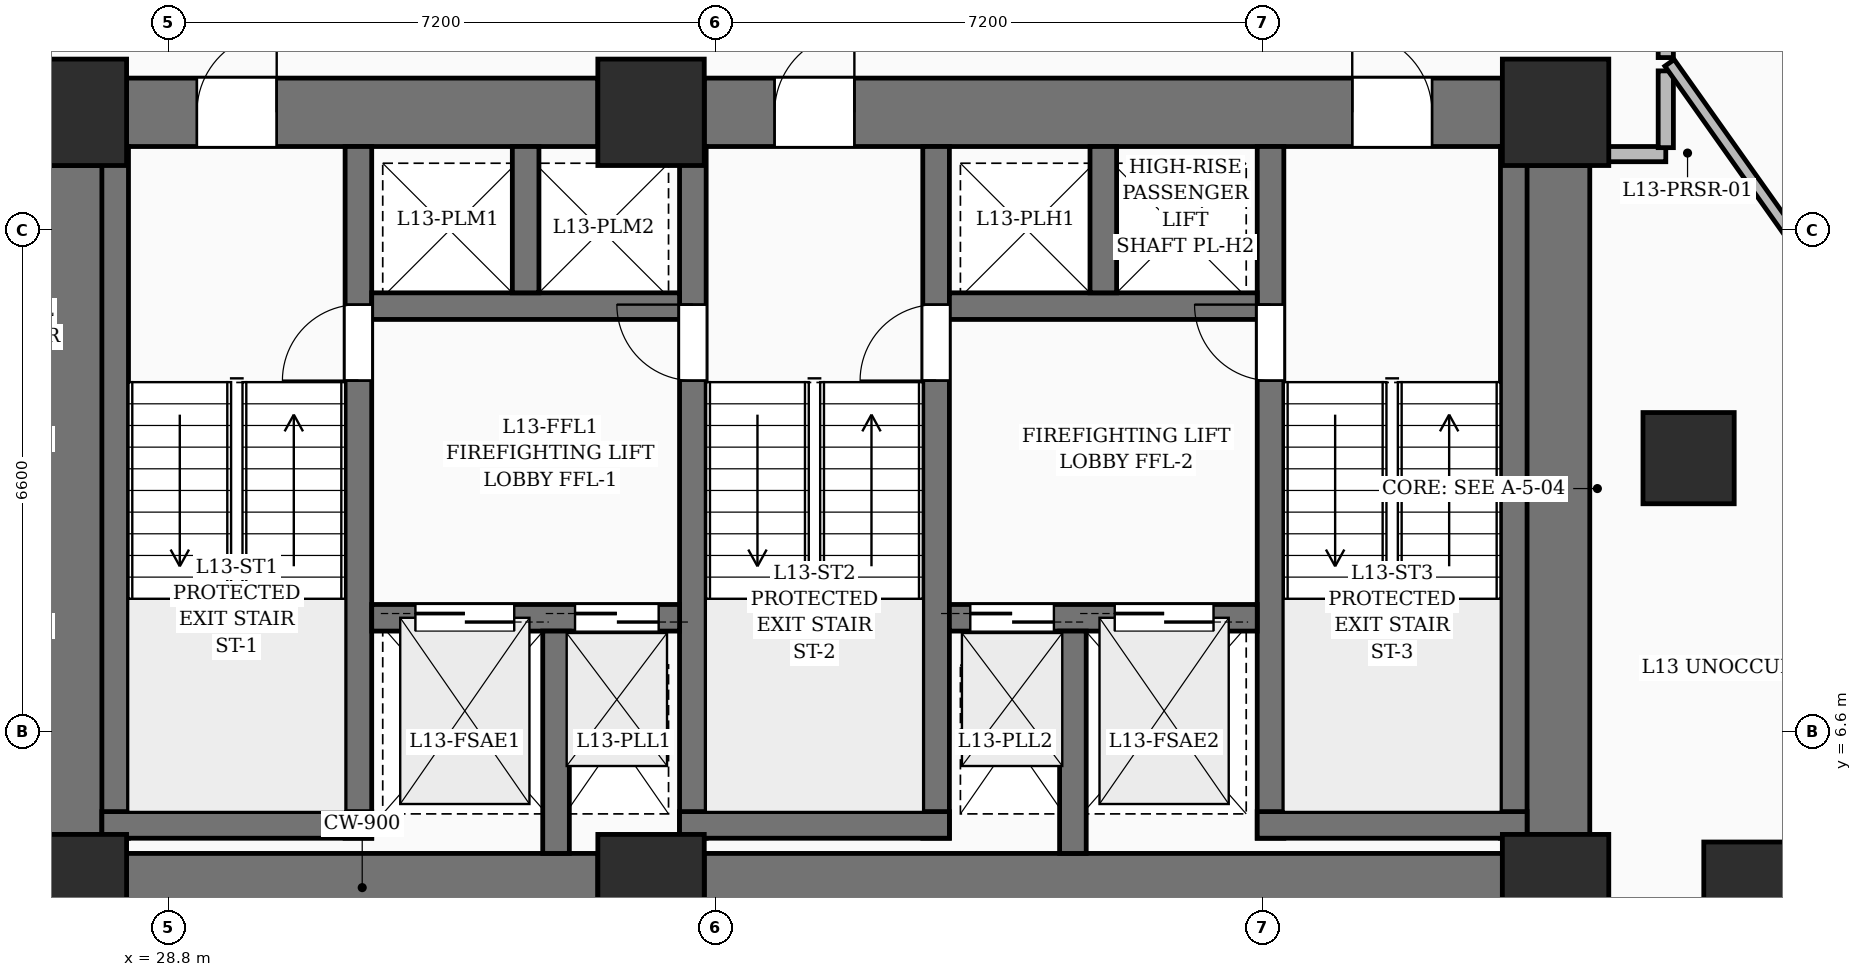
"""IFC4 building model, lengths in metres.
Left out: names, types, materials, properties, quantities, classifications, styles, units other than length and angle.
Written with IfcOpenShell. Run it as: python <this file> out.ifc"""

import sys

from ifc_helpers import new_model, si_unit, direction, frame, frame_2d, origin, origin_2d, place, context, subcontext, project, spatial, rectangle, extrude, element, fill, save


model = new_model("IFC4")
c1 = context("Model", 3, precision=1e-05, world=origin(), true_north=direction((0.0, 1.0)))
c2 = subcontext(c1, "Body", "Model", "MODEL_VIEW")
j1 = project(units=[si_unit("LENGTHUNIT", "METRE"), si_unit("PLANEANGLEUNIT", "RADIAN")], contexts=[c1])
p1 = place(None, origin())
s1 = spatial("IfcSite", under=j1, at=p1, CompositionType="ELEMENT")
p2 = place(p1, origin())
s2 = spatial("IfcBuilding", under=s1, at=p2, CompositionType="ELEMENT")
p3 = place(p2, frame((0.0, 0.0, 57.0)))
s3 = spatial("IfcBuildingStorey", under=s2, at=p3, CompositionType="ELEMENT", Elevation=57.0)
for number, where, z_axis, x_axis in (
    (1, (27.55, 4.55, 0.0), (0.0, 0.0, 1.0), (1.0, 0.0, 0.0)),
    (2, (35.15, 4.55, 0.0), (0.0, 0.0, 1.0), (1.0, 0.0, 0.0)),
    (3, (47.05, 4.55, 0.0), (0.0, 0.0, 1.0), (1.0, 0.0, 0.0)),
    (4, (27.55, 14.75, 0.0), (0.0, 0.0, 1.0), (1.0, 0.0, 0.0)),
    (5, (35.15, 14.75, 0.0), (0.0, 0.0, 1.0), (1.0, 0.0, 0.0)),
    (6, (47.05, 14.75, 0.0), (0.0, 0.0, 1.0), (1.0, 0.0, 0.0)),
):
    element("IfcColumn", number, at=place(p3, frame(where, z_axis=z_axis, x_axis=x_axis)), inside=s3, PredefinedType="COLUMN", context=c2, shape_type="SweptSolid", body=[
        extrude(rectangle(XDim=1.4, YDim=1.4, at=origin_2d()), origin(), (0.0, 0.0, 1.0), 3.6),
    ])
for number, where, z_axis, x_axis in (
    (7, (49.6, 4.55, 0.0), (0.0, 0.0, 1.0), (1.0, 0.0, 0.0)),
    (8, (48.8, 10.2, 0.0), (0.0, 0.0, 1.0), (1.0, 0.0, 0.0)),
):
    element("IfcColumn", number, at=place(p3, frame(where, z_axis=z_axis, x_axis=x_axis)), inside=s3, PredefinedType="COLUMN", context=c2, shape_type="SweptSolid", body=[
        extrude(rectangle(XDim=1.2, YDim=1.2, at=origin_2d()), origin(), (0.0, 0.0, 1.0), 3.6),
    ])
p4 = place(p3, frame((28.25, 4.55, 0.0), z_axis=(0.0, 0.0, 1.0), x_axis=(1.0, 0.0, 0.0)))
e9 = element("IfcWall", 9, at=p4, inside=s3, PredefinedType="SHEAR", context=c2, shape_type="SweptSolid", body=[
    extrude(rectangle(XDim=6.2, YDim=0.9, at=frame_2d((3.1, 0.0))), origin(), (0.0, 0.0, 1.0), 3.6),
])
p5 = place(p3, frame((35.85, 4.55, 0.0), z_axis=(0.0, 0.0, 1.0), x_axis=(1.0, 0.0, 0.0)))
e10 = element("IfcWall", 10, at=p5, inside=s3, PredefinedType="SHEAR", context=c2, shape_type="SweptSolid", body=[
    extrude(rectangle(XDim=10.5, YDim=0.9, at=frame_2d((5.25, 0.0))), origin(), (0.0, 0.0, 1.0), 3.6),
])
p6 = place(p3, frame((28.25, 14.75, 0.0), z_axis=(0.0, 0.0, 1.0), x_axis=(1.0, 0.0, 0.0)))
e11 = element("IfcWall", 11, at=p6, inside=s3, PredefinedType="SHEAR", context=c2, shape_type="SweptSolid", body=[
    extrude(rectangle(XDim=6.2, YDim=0.9, at=frame_2d((3.1, 0.0))), origin(), (0.0, 0.0, 1.0), 3.6),
])
p7 = place(p6, frame((0.925, 0.0, 0.0)))
e12 = element("IfcOpeningElement", 12, at=p7, cuts=e11, PredefinedType="OPENING", context=c2, shape_type="SweptSolid", body=[
    extrude(rectangle(XDim=1.05, YDim=2.15, at=frame_2d((0.525, 1.075))), frame((0.0, 0.46, 0.0), z_axis=(0.0, -1.0, 0.0), x_axis=(1.0, 0.0, 0.0)), (0.0, 0.0, 1.0), 0.92),
])
p8 = place(p3, frame((35.85, 14.75, 0.0), z_axis=(0.0, 0.0, 1.0), x_axis=(1.0, 0.0, 0.0)))
e13 = element("IfcWall", 13, at=p8, inside=s3, PredefinedType="SHEAR", context=c2, shape_type="SweptSolid", body=[
    extrude(rectangle(XDim=10.5, YDim=0.9, at=frame_2d((5.25, 0.0))), origin(), (0.0, 0.0, 1.0), 3.6),
])
p9 = place(p8, frame((0.925, 0.0, 0.0)))
e14 = element("IfcOpeningElement", 14, at=p9, cuts=e13, PredefinedType="OPENING", context=c2, shape_type="SweptSolid", body=[
    extrude(rectangle(XDim=1.05, YDim=2.15, at=frame_2d((0.525, 1.075))), frame((0.0, 0.46, 0.0), z_axis=(0.0, -1.0, 0.0), x_axis=(1.0, 0.0, 0.0)), (0.0, 0.0, 1.0), 0.92),
])
p10 = place(p8, frame((8.525, 0.0, 0.0)))
e15 = element("IfcOpeningElement", 15, at=p10, cuts=e13, PredefinedType="OPENING", context=c2, shape_type="SweptSolid", body=[
    extrude(rectangle(XDim=1.05, YDim=2.15, at=frame_2d((0.525, 1.075))), frame((0.0, 0.46, 0.0), z_axis=(0.0, -1.0, 0.0), x_axis=(1.0, 0.0, 0.0)), (0.0, 0.0, 1.0), 0.92),
])
for number, where, z_axis, x_axis in (
    (16, (27.55, 5.25, 0.0), (0.0, 0.0, 1.0), (0.0, 1.0, 0.0)),
    (17, (47.05, 5.25, 0.0), (0.0, 0.0, 1.0), (0.0, 1.0, 0.0)),
):
    element("IfcWall", number, at=place(p3, frame(where, z_axis=z_axis, x_axis=x_axis)), inside=s3, PredefinedType="SHEAR", context=c2, shape_type="SweptSolid", body=[
        extrude(rectangle(XDim=8.8, YDim=0.9, at=frame_2d((4.4, 0.0))), origin(), (0.0, 0.0, 1.0), 3.6),
    ])
p11 = place(p3, frame((28.1, 5.2, 0.0), z_axis=(0.0, 0.0, 1.0), x_axis=(0.0, 1.0, 0.0)))
e18 = element("IfcWall", 18, at=p11, inside=s3, PredefinedType="SOLIDWALL", context=c2, shape_type="SweptSolid", body=[
    extrude(rectangle(XDim=9.1, YDim=0.35, at=frame_2d((4.55, 0.0))), origin(), (0.0, 0.0, 1.0), 3.6),
])
p12 = place(p3, frame((31.3, 5.2, 0.0), z_axis=(0.0, 0.0, 1.0), x_axis=(0.0, 1.0, 0.0)))
e19 = element("IfcWall", 19, at=p12, inside=s3, PredefinedType="SOLIDWALL", context=c2, shape_type="SweptSolid", body=[
    extrude(rectangle(XDim=9.1, YDim=0.35, at=frame_2d((4.55, 0.0))), origin(), (0.0, 0.0, 1.0), 3.6),
])
p13 = place(p12, frame((6.02, 0.0, 0.0)))
e20 = element("IfcOpeningElement", 20, at=p13, cuts=e19, PredefinedType="OPENING", context=c2, shape_type="SweptSolid", body=[
    extrude(rectangle(XDim=1.0, YDim=2.15, at=frame_2d((0.5, 1.075))), frame((0.0, 0.185, 0.0), z_axis=(0.0, -1.0, 0.0), x_axis=(1.0, 0.0, 0.0)), (0.0, 0.0, 1.0), 0.37),
])
p14 = place(p3, frame((27.925, 5.375, 0.0), z_axis=(0.0, 0.0, 1.0), x_axis=(1.0, 0.0, 0.0)))
e21 = element("IfcWall", 21, at=p14, inside=s3, PredefinedType="SOLIDWALL", context=c2, shape_type="SweptSolid", body=[
    extrude(rectangle(XDim=3.55, YDim=0.35, at=frame_2d((1.775, 0.0))), origin(), (0.0, 0.0, 1.0), 3.6),
])
p15 = place(p3, frame((35.7, 5.2, 0.0), z_axis=(0.0, 0.0, 1.0), x_axis=(0.0, 1.0, 0.0)))
e22 = element("IfcWall", 22, at=p15, inside=s3, PredefinedType="SOLIDWALL", context=c2, shape_type="SweptSolid", body=[
    extrude(rectangle(XDim=9.1, YDim=0.35, at=frame_2d((4.55, 0.0))), origin(), (0.0, 0.0, 1.0), 3.6),
])
p16 = place(p15, frame((6.02, 0.0, 0.0)))
e23 = element("IfcOpeningElement", 23, at=p16, cuts=e22, PredefinedType="OPENING", context=c2, shape_type="SweptSolid", body=[
    extrude(rectangle(XDim=1.0, YDim=2.15, at=frame_2d((0.5, 1.075))), frame((0.0, 0.185, 0.0), z_axis=(0.0, -1.0, 0.0), x_axis=(1.0, 0.0, 0.0)), (0.0, 0.0, 1.0), 0.37),
])
p17 = place(p3, frame((38.9, 5.2, 0.0), z_axis=(0.0, 0.0, 1.0), x_axis=(0.0, 1.0, 0.0)))
e24 = element("IfcWall", 24, at=p17, inside=s3, PredefinedType="SOLIDWALL", context=c2, shape_type="SweptSolid", body=[
    extrude(rectangle(XDim=9.1, YDim=0.35, at=frame_2d((4.55, 0.0))), origin(), (0.0, 0.0, 1.0), 3.6),
])
p18 = place(p17, frame((6.02, 0.0, 0.0)))
e25 = element("IfcOpeningElement", 25, at=p18, cuts=e24, PredefinedType="OPENING", context=c2, shape_type="SweptSolid", body=[
    extrude(rectangle(XDim=1.0, YDim=2.15, at=frame_2d((0.5, 1.075))), frame((0.0, 0.185, 0.0), z_axis=(0.0, -1.0, 0.0), x_axis=(1.0, 0.0, 0.0)), (0.0, 0.0, 1.0), 0.37),
])
p19 = place(p3, frame((35.525, 5.375, 0.0), z_axis=(0.0, 0.0, 1.0), x_axis=(1.0, 0.0, 0.0)))
e26 = element("IfcWall", 26, at=p19, inside=s3, PredefinedType="SOLIDWALL", context=c2, shape_type="SweptSolid", body=[
    extrude(rectangle(XDim=3.55, YDim=0.35, at=frame_2d((1.775, 0.0))), origin(), (0.0, 0.0, 1.0), 3.6),
])
p20 = place(p3, frame((43.3, 5.2, 0.0), z_axis=(0.0, 0.0, 1.0), x_axis=(0.0, 1.0, 0.0)))
e27 = element("IfcWall", 27, at=p20, inside=s3, PredefinedType="SOLIDWALL", context=c2, shape_type="SweptSolid", body=[
    extrude(rectangle(XDim=9.1, YDim=0.35, at=frame_2d((4.55, 0.0))), origin(), (0.0, 0.0, 1.0), 3.6),
])
p21 = place(p20, frame((6.02, 0.0, 0.0)))
e28 = element("IfcOpeningElement", 28, at=p21, cuts=e27, PredefinedType="OPENING", context=c2, shape_type="SweptSolid", body=[
    extrude(rectangle(XDim=1.0, YDim=2.15, at=frame_2d((0.5, 1.075))), frame((0.0, 0.185, 0.0), z_axis=(0.0, -1.0, 0.0), x_axis=(1.0, 0.0, 0.0)), (0.0, 0.0, 1.0), 0.37),
])
p22 = place(p3, frame((46.5, 5.2, 0.0), z_axis=(0.0, 0.0, 1.0), x_axis=(0.0, 1.0, 0.0)))
e29 = element("IfcWall", 29, at=p22, inside=s3, PredefinedType="SOLIDWALL", context=c2, shape_type="SweptSolid", body=[
    extrude(rectangle(XDim=9.1, YDim=0.35, at=frame_2d((4.55, 0.0))), origin(), (0.0, 0.0, 1.0), 3.6),
])
p23 = place(p3, frame((43.125, 5.375, 0.0), z_axis=(0.0, 0.0, 1.0), x_axis=(1.0, 0.0, 0.0)))
e30 = element("IfcWall", 30, at=p23, inside=s3, PredefinedType="SOLIDWALL", context=c2, shape_type="SweptSolid", body=[
    extrude(rectangle(XDim=3.55, YDim=0.35, at=frame_2d((1.775, 0.0))), origin(), (0.0, 0.0, 1.0), 3.6),
])
p24 = place(p3, frame((31.475, 8.1, 0.0), z_axis=(0.0, 0.0, 1.0), x_axis=(1.0, 0.0, 0.0)))
e31 = element("IfcWall", 31, at=p24, inside=s3, PredefinedType="SOLIDWALL", context=c2, shape_type="SweptSolid", body=[
    extrude(rectangle(XDim=4.05, YDim=0.35, at=frame_2d((2.025, 0.0))), origin(), (0.0, 0.0, 1.0), 3.6),
])
p25 = place(p24, frame((0.575, 0.0, 0.0)))
e32 = element("IfcOpeningElement", 32, at=p25, cuts=e31, PredefinedType="OPENING", context=c2, shape_type="SweptSolid", body=[
    extrude(rectangle(XDim=1.3, YDim=2.25, at=frame_2d((0.65, 1.125))), frame((0.0, 0.185, 0.0), z_axis=(0.0, -1.0, 0.0), x_axis=(1.0, 0.0, 0.0)), (0.0, 0.0, 1.0), 0.37),
])
p26 = place(p24, frame((2.675, 0.0, 0.0)))
e33 = element("IfcOpeningElement", 33, at=p26, cuts=e31, PredefinedType="OPENING", context=c2, shape_type="SweptSolid", body=[
    extrude(rectangle(XDim=1.1, YDim=2.2, at=frame_2d((0.55, 1.1))), frame((0.0, 0.185, 0.0), z_axis=(0.0, -1.0, 0.0), x_axis=(1.0, 0.0, 0.0)), (0.0, 0.0, 1.0), 0.37),
])
p27 = place(p3, frame((39.075, 8.1, 0.0), z_axis=(0.0, 0.0, 1.0), x_axis=(1.0, 0.0, 0.0)))
e34 = element("IfcWall", 34, at=p27, inside=s3, PredefinedType="SOLIDWALL", context=c2, shape_type="SweptSolid", body=[
    extrude(rectangle(XDim=4.05, YDim=0.35, at=frame_2d((2.025, 0.0))), origin(), (0.0, 0.0, 1.0), 3.6),
])
p28 = place(p27, frame((2.175, 0.0, 0.0)))
e35 = element("IfcOpeningElement", 35, at=p28, cuts=e34, PredefinedType="OPENING", context=c2, shape_type="SweptSolid", body=[
    extrude(rectangle(XDim=1.3, YDim=2.25, at=frame_2d((0.65, 1.125))), frame((0.0, 0.185, 0.0), z_axis=(0.0, -1.0, 0.0), x_axis=(1.0, 0.0, 0.0)), (0.0, 0.0, 1.0), 0.37),
])
p29 = place(p27, frame((0.275, 0.0, 0.0)))
e36 = element("IfcOpeningElement", 36, at=p29, cuts=e34, PredefinedType="OPENING", context=c2, shape_type="SweptSolid", body=[
    extrude(rectangle(XDim=1.1, YDim=2.2, at=frame_2d((0.55, 1.1))), frame((0.0, 0.185, 0.0), z_axis=(0.0, -1.0, 0.0), x_axis=(1.0, 0.0, 0.0)), (0.0, 0.0, 1.0), 0.37),
])
for number, where, z_axis, x_axis in (
    (37, (33.9, 5.0, 0.0), (0.0, 0.0, 1.0), (0.0, 1.0, 0.0)),
    (38, (40.7, 5.0, 0.0), (0.0, 0.0, 1.0), (0.0, 1.0, 0.0)),
):
    element("IfcWall", number, at=place(p3, frame(where, z_axis=z_axis, x_axis=x_axis)), inside=s3, PredefinedType="SOLIDWALL", context=c2, shape_type="SweptSolid", body=[
        extrude(rectangle(XDim=2.925, YDim=0.35, at=frame_2d((1.462, 0.0))), origin(), (0.0, 0.0, 1.0), 3.6),
    ])
p30 = place(p3, frame((31.475, 12.2, 0.0), z_axis=(0.0, 0.0, 1.0), x_axis=(1.0, 0.0, 0.0)))
e39 = element("IfcWall", 39, at=p30, inside=s3, PredefinedType="SOLIDWALL", context=c2, shape_type="SweptSolid", body=[
    extrude(rectangle(XDim=4.05, YDim=0.35, at=frame_2d((2.025, 0.0))), origin(), (0.0, 0.0, 1.0), 3.6),
])
p31 = place(p3, frame((33.5, 12.375, 0.0), z_axis=(0.0, 0.0, 1.0), x_axis=(0.0, 1.0, 0.0)))
e40 = element("IfcWall", 40, at=p31, inside=s3, PredefinedType="SOLIDWALL", context=c2, shape_type="SweptSolid", body=[
    extrude(rectangle(XDim=1.925, YDim=0.35, at=frame_2d((0.962, 0.0))), origin(), (0.0, 0.0, 1.0), 3.6),
])
p32 = place(p3, frame((39.075, 12.2, 0.0), z_axis=(0.0, 0.0, 1.0), x_axis=(1.0, 0.0, 0.0)))
e41 = element("IfcWall", 41, at=p32, inside=s3, PredefinedType="SOLIDWALL", context=c2, shape_type="SweptSolid", body=[
    extrude(rectangle(XDim=4.05, YDim=0.35, at=frame_2d((2.025, 0.0))), origin(), (0.0, 0.0, 1.0), 3.6),
])
p33 = place(p3, frame((41.1, 12.375, 0.0), z_axis=(0.0, 0.0, 1.0), x_axis=(0.0, 1.0, 0.0)))
e42 = element("IfcWall", 42, at=p33, inside=s3, PredefinedType="SOLIDWALL", context=c2, shape_type="SweptSolid", body=[
    extrude(rectangle(XDim=1.925, YDim=0.35, at=frame_2d((0.962, 0.0))), origin(), (0.0, 0.0, 1.0), 3.6),
])
p34 = place(p3, frame((47.5, 14.2, 0.0), z_axis=(0.0, 0.0, 1.0), x_axis=(1.0, 0.0, 0.0)))
e43 = element("IfcWall", 43, at=p34, inside=s3, PredefinedType="PARTITIONING", context=c2, shape_type="SweptSolid", body=[
    extrude(rectangle(XDim=1.0, YDim=0.2, at=frame_2d((0.5, 0.0))), origin(), (0.0, 0.0, 1.0), 3.35),
])
p35 = place(p3, frame((48.5, 14.285, 0.0), z_axis=(0.0, 0.0, 1.0), x_axis=(0.0, 1.0, 0.0)))
e44 = element("IfcWall", 44, at=p35, inside=s3, PredefinedType="PARTITIONING", context=c2, shape_type="SweptSolid", body=[
    extrude(rectangle(XDim=1.01, YDim=0.2, at=frame_2d((0.505, 0.0))), origin(), (0.0, 0.0, 1.0), 3.35),
])
p36 = place(p3, frame((48.5, 15.47, 0.0), z_axis=(0.0, 0.0, 1.0), x_axis=(0.0, 1.0, 0.0)))
e45 = element("IfcWall", 45, at=p36, inside=s3, PredefinedType="PARTITIONING", context=c2, shape_type="SweptSolid", body=[
    extrude(rectangle(XDim=2.28, YDim=0.2, at=frame_2d((1.14, 0.0))), origin(), (0.0, 0.0, 1.0), 2.279),
])
p37 = place(p36, frame((0.69, 0.0, 0.0)))
e46 = element("IfcOpeningElement", 46, at=p37, cuts=e45, PredefinedType="OPENING", context=c2, shape_type="SweptSolid", body=[
    extrude(rectangle(XDim=0.9, YDim=2.1, at=frame_2d((0.45, 1.05))), frame((0.0, 0.11, 0.0), z_axis=(0.0, -1.0, 0.0), x_axis=(1.0, 0.0, 0.0)), (0.0, 0.0, 1.0), 0.22),
])
p38 = place(p3, frame((58.097, 1.918, 0.0), z_axis=(0.0, 0.0, 1.0), x_axis=(-0.577911961482, 0.816099114554, 0.0)))
e47 = element("IfcWall", 47, at=p38, inside=s3, PredefinedType="PARTITIONING", context=c2, shape_type="SweptSolid", body=[
    extrude(rectangle(XDim=16.521, YDim=0.15, at=frame_2d((8.26, 0.0))), origin(), (0.0, 0.0, 1.0), 2.279),
])
p39 = place(p7, origin())
e48 = element("IfcDoor", 48, at=p39, inside=s3, OperationType="SINGLE_SWING_RIGHT", PredefinedType="DOOR", context=c2, shape_type="SweptSolid", body=[
    extrude(rectangle(XDim=1.05, YDim=2.15, at=frame_2d((0.525, 1.075))), frame((0.0, 0.025, 0.0), z_axis=(0.0, -1.0, 0.0), x_axis=(1.0, 0.0, 0.0)), (0.0, 0.0, 1.0), 0.05),
])
fill(e12, e48)
p40 = place(p9, origin())
e49 = element("IfcDoor", 49, at=p40, inside=s3, OperationType="SINGLE_SWING_RIGHT", PredefinedType="DOOR", context=c2, shape_type="SweptSolid", body=[
    extrude(rectangle(XDim=1.05, YDim=2.15, at=frame_2d((0.525, 1.075))), frame((0.0, 0.025, 0.0), z_axis=(0.0, -1.0, 0.0), x_axis=(1.0, 0.0, 0.0)), (0.0, 0.0, 1.0), 0.05),
])
fill(e14, e49)
p41 = place(p10, origin())
e50 = element("IfcDoor", 50, at=p41, inside=s3, OperationType="SINGLE_SWING_LEFT", PredefinedType="DOOR", context=c2, shape_type="SweptSolid", body=[
    extrude(rectangle(XDim=1.05, YDim=2.15, at=frame_2d((0.525, 1.075))), frame((0.0, 0.025, 0.0), z_axis=(0.0, -1.0, 0.0), x_axis=(1.0, 0.0, 0.0)), (0.0, 0.0, 1.0), 0.05),
])
fill(e15, e50)
p42 = place(p13, origin())
e51 = element("IfcDoor", 51, at=p42, inside=s3, OperationType="SINGLE_SWING_LEFT", PredefinedType="DOOR", context=c2, shape_type="SweptSolid", body=[
    extrude(rectangle(XDim=1.0, YDim=2.15, at=frame_2d((0.5, 1.075))), frame((0.0, 0.025, 0.0), z_axis=(0.0, -1.0, 0.0), x_axis=(1.0, 0.0, 0.0)), (0.0, 0.0, 1.0), 0.05),
])
fill(e20, e51)
p43 = place(p16, origin())
e52 = element("IfcDoor", 52, at=p43, inside=s3, OperationType="SINGLE_SWING_RIGHT", PredefinedType="DOOR", context=c2, shape_type="SweptSolid", body=[
    extrude(rectangle(XDim=1.0, YDim=2.15, at=frame_2d((0.5, 1.075))), frame((0.0, 0.025, 0.0), z_axis=(0.0, -1.0, 0.0), x_axis=(1.0, 0.0, 0.0)), (0.0, 0.0, 1.0), 0.05),
])
fill(e23, e52)
p44 = place(p18, origin())
e53 = element("IfcDoor", 53, at=p44, inside=s3, OperationType="SINGLE_SWING_LEFT", PredefinedType="DOOR", context=c2, shape_type="SweptSolid", body=[
    extrude(rectangle(XDim=1.0, YDim=2.15, at=frame_2d((0.5, 1.075))), frame((0.0, 0.025, 0.0), z_axis=(0.0, -1.0, 0.0), x_axis=(1.0, 0.0, 0.0)), (0.0, 0.0, 1.0), 0.05),
])
fill(e25, e53)
p45 = place(p21, origin())
e54 = element("IfcDoor", 54, at=p45, inside=s3, OperationType="SINGLE_SWING_RIGHT", PredefinedType="DOOR", context=c2, shape_type="SweptSolid", body=[
    extrude(rectangle(XDim=1.0, YDim=2.15, at=frame_2d((0.5, 1.075))), frame((0.0, 0.025, 0.0), z_axis=(0.0, -1.0, 0.0), x_axis=(1.0, 0.0, 0.0)), (0.0, 0.0, 1.0), 0.05),
])
fill(e28, e54)
p46 = place(p25, origin())
e55 = element("IfcDoor", 55, at=p46, inside=s3, OperationType="DOUBLE_DOOR_SLIDING", PredefinedType="DOOR", context=c2, shape_type="SweptSolid", body=[
    extrude(rectangle(XDim=1.3, YDim=2.25, at=frame_2d((0.65, 1.125))), frame((0.0, 0.025, 0.0), z_axis=(0.0, -1.0, 0.0), x_axis=(1.0, 0.0, 0.0)), (0.0, 0.0, 1.0), 0.05),
])
fill(e32, e55)
p47 = place(p28, origin())
e56 = element("IfcDoor", 56, at=p47, inside=s3, OperationType="DOUBLE_DOOR_SLIDING", PredefinedType="DOOR", context=c2, shape_type="SweptSolid", body=[
    extrude(rectangle(XDim=1.3, YDim=2.25, at=frame_2d((0.65, 1.125))), frame((0.0, 0.025, 0.0), z_axis=(0.0, -1.0, 0.0), x_axis=(1.0, 0.0, 0.0)), (0.0, 0.0, 1.0), 0.05),
])
fill(e35, e56)
p48 = place(p26, origin())
e57 = element("IfcDoor", 57, at=p48, inside=s3, OperationType="DOUBLE_DOOR_SLIDING", PredefinedType="DOOR", context=c2, shape_type="SweptSolid", body=[
    extrude(rectangle(XDim=1.1, YDim=2.2, at=frame_2d((0.55, 1.1))), frame((0.0, 0.025, 0.0), z_axis=(0.0, -1.0, 0.0), x_axis=(1.0, 0.0, 0.0)), (0.0, 0.0, 1.0), 0.05),
])
fill(e33, e57)
p49 = place(p29, origin())
e58 = element("IfcDoor", 58, at=p49, inside=s3, OperationType="DOUBLE_DOOR_SLIDING", PredefinedType="DOOR", context=c2, shape_type="SweptSolid", body=[
    extrude(rectangle(XDim=1.1, YDim=2.2, at=frame_2d((0.55, 1.1))), frame((0.0, 0.025, 0.0), z_axis=(0.0, -1.0, 0.0), x_axis=(1.0, 0.0, 0.0)), (0.0, 0.0, 1.0), 0.05),
])
fill(e36, e58)
save(model, sys.argv[1])
